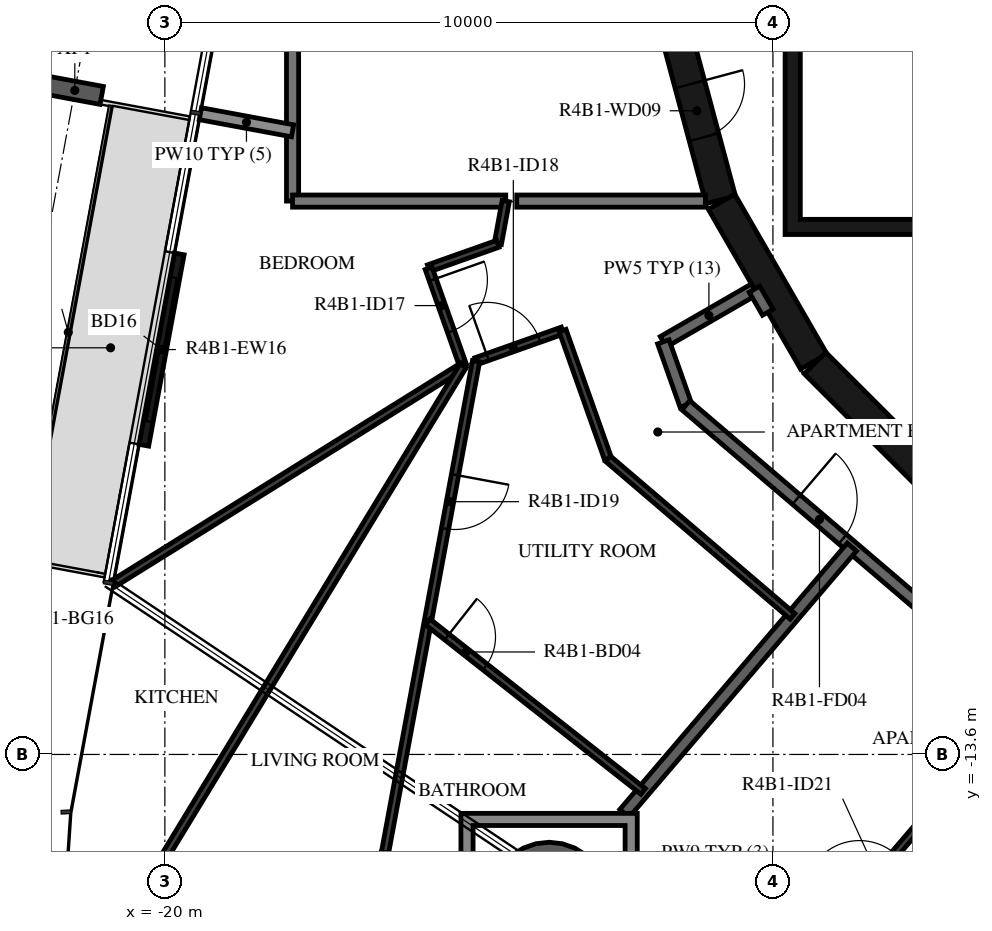
"""IFC4 building model, lengths in metres.
Left out: names, types, materials, properties, quantities, classifications, styles, units other than length and angle.
Written with IfcOpenShell. Run it as: python <this file> out.ifc"""

import sys

from ifc_helpers import new_model, si_unit, direction, frame, frame_2d, origin, origin_2d, place, context, subcontext, project, spatial, polyline, rectangle, hollow_circle, i_section, outline, extrude, element, fill, save


model = new_model("IFC4")
c1 = context("Model", 3, precision=1e-05, world=origin(), true_north=direction((0.0, 1.0)))
c2 = subcontext(c1, "Body", "Model", "MODEL_VIEW")
j1 = project(units=[si_unit("LENGTHUNIT", "METRE"), si_unit("PLANEANGLEUNIT", "RADIAN")], contexts=[c1])
p1 = place(None, origin())
s1 = spatial("IfcSite", under=j1, at=p1, CompositionType="ELEMENT")
p2 = place(p1, origin())
s2 = spatial("IfcBuilding", under=s1, at=p2, CompositionType="ELEMENT")
p3 = place(p2, frame((0.0, 0.0, 162.2)))
s3 = spatial("IfcBuildingStorey", under=s2, at=p3, CompositionType="ELEMENT", Elevation=162.2)
p4 = place(p3, frame((-13.681, -16.019, -0.38), z_axis=(0.0, 0.0, 1.0), x_axis=(1.0, 0.0, 0.0)))
e1 = element("IfcColumn", 1, at=p4, inside=s3, PredefinedType="COLUMN", context=c2, shape_type="SweptSolid", body=[
    extrude(hollow_circle(Radius=0.975, WallThickness=0.045, at=origin_2d()), origin(), (0.0, 0.0, 1.0), 3.5),
])
p5 = place(p3, frame((-21.481, -2.68, -0.38), z_axis=(0.0, 0.0, 1.0), x_axis=(0.182235967681, 0.983254825609, 0.0)))
e2 = element("IfcColumn", 2, at=p5, inside=s3, PredefinedType="COLUMN", context=c2, shape_type="SweptSolid", body=[
    extrude(i_section(OverallWidth=0.3, OverallDepth=0.9, WebThickness=0.019, FlangeThickness=0.035, FilletRadius=0.03, at=origin_2d()), origin(), (0.0, 0.0, 1.0), 3.5),
])
p6 = place(p3, frame((-19.762, -5.369, 0.0), z_axis=(0.0, 0.0, 1.0), x_axis=(-0.18226136951, -0.983250117307, 0.0)))
e3 = element("IfcWall", 3, at=p6, inside=s3, PredefinedType="STANDARD", context=c2, shape_type="SweptSolid", body=[
    extrude(rectangle(XDim=3.2, YDim=0.16, at=frame_2d((1.6, 0.0))), origin(), (0.0, 0.0, 1.0), 3.12),
])
p7 = place(p6, frame((0.4, 0.0, 0.0)))
e4 = element("IfcOpeningElement", 4, at=p7, cuts=e3, PredefinedType="OPENING", context=c2, shape_type="SweptSolid", body=[
    extrude(rectangle(XDim=2.4, YDim=2.4, at=frame_2d((1.2, 1.2))), frame((0.0, 0.09, 0.0), z_axis=(0.0, -1.0, 0.0), x_axis=(1.0, 0.0, 0.0)), (0.0, 0.0, 1.0), 0.18),
])
p8 = place(p3, frame((-11.643, -1.55, 0.0), z_axis=(0.0, 0.0, 1.0), x_axis=(0.258734743916, -0.965948410781, 0.0)))
e5 = element("IfcWall", 5, at=p8, inside=s3, PredefinedType="SHEAR", context=c2, shape_type="SweptSolid", body=[
    extrude(rectangle(XDim=3.033, YDim=0.5, at=frame_2d((1.516, 0.0))), origin(), (0.0, 0.0, 1.0), 3.12),
])
p9 = place(p8, frame((1.066, 0.0, 0.0)))
e6 = element("IfcOpeningElement", 6, at=p9, cuts=e5, PredefinedType="OPENING", context=c2, shape_type="SweptSolid", body=[
    extrude(rectangle(XDim=0.9, YDim=2.1, at=frame_2d((0.45, 1.05))), frame((0.0, 0.26, 0.0), z_axis=(0.0, -1.0, 0.0), x_axis=(1.0, 0.0, 0.0)), (0.0, 0.0, 1.0), 0.52),
])
p10 = place(p3, frame((-10.845, -4.51, 0.0), z_axis=(0.0, 0.0, 1.0), x_axis=(0.500087131594, -0.865975092491, 0.0)))
e7 = element("IfcWall", 7, at=p10, inside=s3, PredefinedType="SHEAR", context=c2, shape_type="SweptSolid", body=[
    extrude(rectangle(XDim=3.033, YDim=0.5, at=frame_2d((1.516, 0.0))), origin(), (0.0, 0.0, 1.0), 3.12),
])
p11 = place(p3, frame((-9.308, -7.164, 0.0), z_axis=(0.0, 0.0, 1.0), x_axis=(0.707106781187, -0.707106781187, 0.0)))
e8 = element("IfcWall", 8, at=p11, inside=s3, PredefinedType="SHEAR", context=c2, shape_type="SweptSolid", body=[
    extrude(rectangle(XDim=3.032, YDim=0.5, at=frame_2d((1.516, 0.0))), origin(), (0.0, 0.0, 1.0), 3.12),
])
p12 = place(p3, origin())
e9 = element("IfcWall", 9, at=p12, inside=s3, PredefinedType="SHEAR", context=c2, shape_type="SweptSolid", body=[
    extrude(outline(polyline([(9.8, -5.05), (9.8, -4.8), (9.8, -1.9), (9.55, -1.9), (9.55, -4.8), (7.65, -4.8), (7.65, -1.9), (7.4, -1.9), (7.4, -4.8), (5.5, -4.8), (5.5, -1.9), (5.25, -1.9), (5.25, -4.8), (3.35, -4.8), (3.35, -1.9), (3.1, -1.9), (3.1, -4.8), (1.2, -4.8), (1.2, -1.9), (0.95, -1.9), (0.95, -4.8), (-5.25, -4.8), (-5.25, -1.9), (-5.5, -1.9), (-5.5, -4.8), (-7.4, -4.8), (-7.4, -1.9), (-7.65, -1.9), (-7.65, -4.8), (-9.55, -4.8), (-9.55, -1.9), (-9.8, -1.9), (-9.8, -4.8), (-9.8, -5.05), (9.8, -5.05)])), origin(), (0.0, 0.0, 1.0), 3.12),
])
p13 = place(p3, frame((-10.303, -5.949, 0.0), z_axis=(0.0, 0.0, 1.0), x_axis=(-0.866021168401, -0.500007335828, 0.0)))
e10 = element("IfcWall", 10, at=p13, inside=s3, PredefinedType="STANDARD", context=c2, shape_type="SweptSolid", body=[
    extrude(rectangle(XDim=1.731, YDim=0.2, at=frame_2d((0.865, 0.0))), origin(), (0.0, 0.0, 1.0), 3.12),
])
p14 = place(p3, frame((-11.802, -6.814, 0.0), z_axis=(0.0, 0.0, 1.0), x_axis=(0.333904297771, -0.942606980629, 0.0)))
e11 = element("IfcWall", 11, at=p14, inside=s3, PredefinedType="STANDARD", context=c2, shape_type="SweptSolid", body=[
    extrude(rectangle(XDim=1.107, YDim=0.2, at=frame_2d((0.553, 0.0))), origin(), (0.0, 0.0, 1.0), 3.12),
])
p15 = place(p3, frame((-11.433, -7.858, 0.0), z_axis=(0.0, 0.0, 1.0), x_axis=(0.760412154545, -0.649440801937, 0.0)))
e12 = element("IfcWall", 12, at=p15, inside=s3, PredefinedType="STANDARD", context=c2, shape_type="SweptSolid", body=[
    extrude(rectangle(XDim=7.181, YDim=0.2, at=frame_2d((3.59, 0.0))), origin(), (0.0, 0.0, 1.0), 3.12),
])
p16 = place(p15, frame((2.39, 0.0, 0.0)))
e13 = element("IfcOpeningElement", 13, at=p16, cuts=e12, PredefinedType="OPENING", context=c2, shape_type="SweptSolid", body=[
    extrude(rectangle(XDim=1.0, YDim=2.1, at=frame_2d((0.5, 1.05))), frame((0.0, 0.11, 0.0), z_axis=(0.0, -1.0, 0.0), x_axis=(1.0, 0.0, 0.0)), (0.0, 0.0, 1.0), 0.22),
])
p17 = place(p3, frame((-10.303, -5.949, 0.0), z_axis=(0.0, 0.0, 1.0), x_axis=(0.499980071345, -0.866036909293, 0.0)))
e14 = element("IfcWall", 14, at=p17, inside=s3, PredefinedType="STANDARD", context=c2, shape_type="SweptSolid", body=[
    extrude(rectangle(XDim=0.438, YDim=0.2, at=frame_2d((0.219, 0.0))), origin(), (0.0, 0.0, 1.0), 3.12),
])
p18 = place(p3, frame((-17.9, 4.5, 0.0), z_axis=(0.0, 0.0, 1.0), x_axis=(0.0, -1.0, 0.0)))
e15 = element("IfcWall", 15, at=p18, inside=s3, PredefinedType="STANDARD", context=c2, shape_type="SweptSolid", body=[
    extrude(rectangle(XDim=9.0, YDim=0.2, at=frame_2d((4.5, 0.0))), origin(), (0.0, 0.0, 1.0), 3.12),
])
p19 = place(p3, frame((-14.213, -4.5, 0.0), z_axis=(0.0, 0.0, 1.0), x_axis=(1.0, 0.0, 0.0)))
e16 = element("IfcWall", 16, at=p19, inside=s3, PredefinedType="STANDARD", context=c2, shape_type="SweptSolid", body=[
    extrude(rectangle(XDim=3.102, YDim=0.2, at=frame_2d((1.551, 0.0))), origin(), (0.0, 0.0, 1.0), 3.12),
])
p20 = place(p3, frame((-17.9, -4.5, 0.0), z_axis=(0.0, 0.0, 1.0), x_axis=(1.0, 0.0, 0.0)))
e17 = element("IfcWall", 17, at=p20, inside=s3, PredefinedType="STANDARD", context=c2, shape_type="SweptSolid", body=[
    extrude(rectangle(XDim=3.506, YDim=0.2, at=frame_2d((1.753, 0.0))), origin(), (0.0, 0.0, 1.0), 3.12),
])
p21 = place(p3, frame((-19.416, -3.063, 0.0), z_axis=(0.0, 0.0, 1.0), x_axis=(0.983258901558, -0.182213974512, 0.0)))
e18 = element("IfcWall", 18, at=p21, inside=s3, PredefinedType="STANDARD", context=c2, shape_type="SweptSolid", body=[
    extrude(rectangle(XDim=1.542, YDim=0.2, at=frame_2d((0.771, 0.0))), origin(), (0.0, 0.0, 1.0), 2.73),
])
p22 = place(p3, frame((-12.441, -14.569, 0.0), z_axis=(0.0, 0.0, 1.0), x_axis=(0.649446013128, 0.760407703822, 0.0)))
e19 = element("IfcWall", 19, at=p22, inside=s3, PredefinedType="STANDARD", context=c2, shape_type="SweptSolid", body=[
    extrude(rectangle(XDim=5.758, YDim=0.2, at=frame_2d((2.879, 0.0))), origin(), (0.0, 0.0, 1.0), 3.12),
])
p23 = place(p3, frame((-14.394, -4.5, 0.0), z_axis=(0.0, 0.0, 1.0), x_axis=(-0.182101494457, -0.983279739299, 0.0)))
e20 = element("IfcWall", 20, at=p23, inside=s3, PredefinedType="PARTITIONING", context=c2, shape_type="SweptSolid", body=[
    extrude(rectangle(XDim=0.715, YDim=0.12, at=frame_2d((0.357, 0.0))), origin(), (0.0, 0.0, 1.0), 3.12),
])
p24 = place(p3, frame((-14.524, -5.203, 0.0), z_axis=(0.0, 0.0, 1.0), x_axis=(-0.942657704592, -0.333761070187, 0.0)))
e21 = element("IfcWall", 21, at=p24, inside=s3, PredefinedType="PARTITIONING", context=c2, shape_type="SweptSolid", body=[
    extrude(rectangle(XDim=1.208, YDim=0.12, at=frame_2d((0.604, 0.0))), origin(), (0.0, 0.0, 1.0), 3.12),
])
p25 = place(p3, frame((-15.663, -5.606, 0.0), z_axis=(0.0, 0.0, 1.0), x_axis=(0.333751436931, -0.942661115325, 0.0)))
e22 = element("IfcWall", 22, at=p25, inside=s3, PredefinedType="PARTITIONING", context=c2, shape_type="SweptSolid", body=[
    extrude(rectangle(XDim=1.7, YDim=0.12, at=frame_2d((0.85, 0.0))), origin(), (0.0, 0.0, 1.0), 3.12),
])
p26 = place(p25, frame((0.2, 0.0, 0.0)))
e23 = element("IfcOpeningElement", 23, at=p26, cuts=e22, PredefinedType="OPENING", context=c2, shape_type="SweptSolid", body=[
    extrude(rectangle(XDim=0.9, YDim=2.1, at=frame_2d((0.45, 1.05))), frame((0.0, 0.07, 0.0), z_axis=(0.0, -1.0, 0.0), x_axis=(1.0, 0.0, 0.0)), (0.0, 0.0, 1.0), 0.14),
])
p27 = place(p3, frame((-14.882, -7.133, 0.0), z_axis=(0.0, 0.0, 1.0), x_axis=(0.942631466676, 0.333835165961, 0.0)))
e24 = element("IfcWall", 24, at=p27, inside=s3, PredefinedType="PARTITIONING", context=c2, shape_type="SweptSolid", body=[
    extrude(rectangle(XDim=1.51, YDim=0.12, at=frame_2d((0.755, 0.0))), origin(), (0.0, 0.0, 1.0), 3.12),
])
p28 = place(p27, frame((0.2, 0.0, 0.0)))
e25 = element("IfcOpeningElement", 25, at=p28, cuts=e24, PredefinedType="OPENING", context=c2, shape_type="SweptSolid", body=[
    extrude(rectangle(XDim=0.9, YDim=2.1, at=frame_2d((0.45, 1.05))), frame((0.0, 0.07, 0.0), z_axis=(0.0, -1.0, 0.0), x_axis=(1.0, 0.0, 0.0)), (0.0, 0.0, 1.0), 0.14),
])
p29 = place(p3, frame((-13.459, -6.629, 0.0), z_axis=(0.0, 0.0, 1.0), x_axis=(0.333790565501, -0.942647260847, 0.0)))
e26 = element("IfcWall", 26, at=p29, inside=s3, PredefinedType="PARTITIONING", context=c2, shape_type="SweptSolid", body=[
    extrude(rectangle(XDim=2.237, YDim=0.12, at=frame_2d((1.118, 0.0))), origin(), (0.0, 0.0, 1.0), 3.12),
])
p30 = place(p3, frame((-12.713, -8.737, 0.0), z_axis=(0.0, 0.0, 1.0), x_axis=(0.760420863476, -0.649430604754, 0.0)))
e27 = element("IfcWall", 27, at=p30, inside=s3, PredefinedType="PARTITIONING", context=c2, shape_type="SweptSolid", body=[
    extrude(rectangle(XDim=3.992, YDim=0.12, at=frame_2d((1.996, 0.0))), origin(), (0.0, 0.0, 1.0), 3.12),
])
p31 = place(p3, frame((-20.849, -10.792, 0.0), z_axis=(0.0, 0.0, 1.0), x_axis=(0.848835001009, 0.528657867682, 0.0)))
e28 = element("IfcWall", 28, at=p31, inside=s3, PredefinedType="PARTITIONING", context=c2, shape_type="SweptSolid", body=[
    extrude(rectangle(XDim=6.778, YDim=0.12, at=frame_2d((3.389, 0.0))), origin(), (0.0, 0.0, 1.0), 3.12),
])
p32 = place(p3, frame((-21.461, -17.671, 0.0), z_axis=(0.0, 0.0, 1.0), x_axis=(0.519791999186, 0.854292852353, 0.0)))
e29 = element("IfcWall", 29, at=p32, inside=s3, PredefinedType="PARTITIONING", context=c2, shape_type="SweptSolid", body=[
    extrude(rectangle(XDim=12.247, YDim=0.12, at=frame_2d((6.124, 0.0))), origin(), (0.0, 0.0, 1.0), 3.12),
])
p33 = place(p32, frame((1.0, 0.0, 0.0)))
e30 = element("IfcOpeningElement", 30, at=p33, cuts=e29, PredefinedType="OPENING", context=c2, shape_type="SweptSolid", body=[
    extrude(rectangle(XDim=0.9, YDim=2.1, at=frame_2d((0.45, 1.05))), frame((0.0, 0.07, 0.0), z_axis=(0.0, -1.0, 0.0), x_axis=(1.0, 0.0, 0.0)), (0.0, 0.0, 1.0), 0.14),
])
p34 = place(p3, frame((-14.882, -7.133, 0.0), z_axis=(0.0, 0.0, 1.0), x_axis=(-0.182231858218, -0.983255587246, 0.0)))
e31 = element("IfcWall", 31, at=p34, inside=s3, PredefinedType="PARTITIONING", context=c2, shape_type="SweptSolid", body=[
    extrude(rectangle(XDim=8.215, YDim=0.12, at=frame_2d((4.107, 0.0))), origin(), (0.0, 0.0, 1.0), 3.12),
])
p35 = place(p34, frame((1.9, 0.0, 0.0)))
e32 = element("IfcOpeningElement", 32, at=p35, cuts=e31, PredefinedType="OPENING", context=c2, shape_type="SweptSolid", body=[
    extrude(rectangle(XDim=0.9, YDim=2.1, at=frame_2d((0.45, 1.05))), frame((0.0, 0.07, 0.0), z_axis=(0.0, -1.0, 0.0), x_axis=(1.0, 0.0, 0.0)), (0.0, 0.0, 1.0), 0.14),
])
p36 = place(p3, frame((-15.677, -11.42, 0.0), z_axis=(0.0, 0.0, 1.0), x_axis=(0.785821888461, -0.618452875824, 0.0)))
e33 = element("IfcWall", 33, at=p36, inside=s3, PredefinedType="PARTITIONING", context=c2, shape_type="SweptSolid", body=[
    extrude(rectangle(XDim=4.507, YDim=0.12, at=frame_2d((2.254, 0.0))), origin(), (0.0, 0.0, 1.0), 3.12),
])
p37 = place(p36, frame((0.4, 0.0, 0.0)))
e34 = element("IfcOpeningElement", 34, at=p37, cuts=e33, PredefinedType="OPENING", context=c2, shape_type="SweptSolid", body=[
    extrude(rectangle(XDim=0.8, YDim=2.1, at=frame_2d((0.4, 1.05))), frame((0.0, 0.07, 0.0), z_axis=(0.0, -1.0, 0.0), x_axis=(1.0, 0.0, 0.0)), (0.0, 0.0, 1.0), 0.14),
])
p38 = place(p3, frame((-16.442, -16.155, 0.0), z_axis=(0.0, 0.0, 1.0), x_axis=(0.066775688713, 0.997768012815, 0.0)))
e35 = element("IfcWall", 35, at=p38, inside=s3, PredefinedType="PARTITIONING", context=c2, shape_type="SweptSolid", body=[
    extrude(rectangle(XDim=0.947, YDim=0.12, at=frame_2d((0.474, 0.0))), origin(), (0.0, 0.0, 1.0), 3.12),
])
p39 = place(p3, frame((-10.063, -17.656, 0.0), z_axis=(0.0, 0.0, 1.0), x_axis=(0.649451567172, 0.760402960211, 0.0)))
e36 = element("IfcWall", 36, at=p39, inside=s3, PredefinedType="PARTITIONING", context=c2, shape_type="SweptSolid", body=[
    extrude(rectangle(XDim=5.061, YDim=0.12, at=frame_2d((2.531, 0.0))), origin(), (0.0, 0.0, 1.0), 3.12),
])
p40 = place(p39, frame((2.288, 0.0, 0.0)))
e37 = element("IfcOpeningElement", 37, at=p40, cuts=e36, PredefinedType="OPENING", context=c2, shape_type="SweptSolid", body=[
    extrude(rectangle(XDim=0.9, YDim=2.1, at=frame_2d((0.45, 1.05))), frame((0.0, 0.07, 0.0), z_axis=(0.0, -1.0, 0.0), x_axis=(1.0, 0.0, 0.0)), (0.0, 0.0, 1.0), 0.14),
])
p41 = place(p3, frame((-1.871, -14.807, 0.0), z_axis=(0.0, 0.0, 1.0), x_axis=(-0.942640759962, -0.333808923874, 0.0)))
e38 = element("IfcWall", 38, at=p41, inside=s3, PredefinedType="PARTITIONING", context=c2, shape_type="SweptSolid", body=[
    extrude(rectangle(XDim=11.234, YDim=0.12, at=frame_2d((5.617, 0.0))), origin(), (0.0, 0.0, 1.0), 3.12),
])
p42 = place(p3, origin())
e39 = element("IfcWall", 39, at=p42, inside=s3, PredefinedType="STANDARD", context=c2, shape_type="SweptSolid", body=[
    extrude(outline(polyline([(-12.231, -14.569), (-12.231, -17.469), (-15.131, -17.469), (-15.131, -14.569), (-12.231, -14.569)]), holes=[polyline([(-14.931, -17.269), (-12.431, -17.269), (-12.431, -14.769), (-14.931, -14.769), (-14.931, -17.269)])]), origin(), (0.0, 0.0, 1.0), 3.12),
])
p43 = place(p7, origin())
e40 = element("IfcDoor", 40, at=p43, inside=s3, OperationType="DOUBLE_DOOR_SLIDING", PredefinedType="DOOR", context=c2, shape_type="SweptSolid", body=[
    extrude(rectangle(XDim=2.4, YDim=2.4, at=frame_2d((1.2, 1.2))), frame((0.0, 0.025, 0.0), z_axis=(0.0, -1.0, 0.0), x_axis=(1.0, 0.0, 0.0)), (0.0, 0.0, 1.0), 0.05),
])
fill(e4, e40)
p44 = place(p9, origin())
e41 = element("IfcDoor", 41, at=p44, inside=s3, OperationType="SINGLE_SWING_LEFT", PredefinedType="DOOR", context=c2, shape_type="SweptSolid", body=[
    extrude(rectangle(XDim=0.9, YDim=2.1, at=frame_2d((0.45, 1.05))), frame((0.0, 0.025, 0.0), z_axis=(0.0, -1.0, 0.0), x_axis=(1.0, 0.0, 0.0)), (0.0, 0.0, 1.0), 0.05),
])
fill(e6, e41)
p45 = place(p16, origin())
e42 = element("IfcDoor", 42, at=p45, inside=s3, OperationType="SINGLE_SWING_RIGHT", PredefinedType="DOOR", context=c2, shape_type="SweptSolid", body=[
    extrude(rectangle(XDim=1.0, YDim=2.1, at=frame_2d((0.5, 1.05))), frame((0.0, 0.025, 0.0), z_axis=(0.0, -1.0, 0.0), x_axis=(1.0, 0.0, 0.0)), (0.0, 0.0, 1.0), 0.05),
])
fill(e13, e42)
p46 = place(p26, origin())
e43 = element("IfcDoor", 43, at=p46, inside=s3, OperationType="SINGLE_SWING_RIGHT", PredefinedType="DOOR", context=c2, shape_type="SweptSolid", body=[
    extrude(rectangle(XDim=0.9, YDim=2.1, at=frame_2d((0.45, 1.05))), frame((0.0, 0.025, 0.0), z_axis=(0.0, -1.0, 0.0), x_axis=(1.0, 0.0, 0.0)), (0.0, 0.0, 1.0), 0.05),
])
fill(e23, e43)
p47 = place(p28, origin())
e44 = element("IfcDoor", 44, at=p47, inside=s3, OperationType="SINGLE_SWING_LEFT", PredefinedType="DOOR", context=c2, shape_type="SweptSolid", body=[
    extrude(rectangle(XDim=0.9, YDim=2.1, at=frame_2d((0.45, 1.05))), frame((0.0, 0.025, 0.0), z_axis=(0.0, -1.0, 0.0), x_axis=(1.0, 0.0, 0.0)), (0.0, 0.0, 1.0), 0.05),
])
fill(e25, e44)
p48 = place(p35, origin())
e45 = element("IfcDoor", 45, at=p48, inside=s3, OperationType="SINGLE_SWING_RIGHT", PredefinedType="DOOR", context=c2, shape_type="SweptSolid", body=[
    extrude(rectangle(XDim=0.9, YDim=2.1, at=frame_2d((0.45, 1.05))), frame((0.0, 0.025, 0.0), z_axis=(0.0, -1.0, 0.0), x_axis=(1.0, 0.0, 0.0)), (0.0, 0.0, 1.0), 0.05),
])
fill(e32, e45)
p49 = place(p37, origin())
e46 = element("IfcDoor", 46, at=p49, inside=s3, OperationType="SINGLE_SWING_RIGHT", PredefinedType="DOOR", context=c2, shape_type="SweptSolid", body=[
    extrude(rectangle(XDim=0.8, YDim=2.1, at=frame_2d((0.4, 1.05))), frame((0.0, 0.025, 0.0), z_axis=(0.0, -1.0, 0.0), x_axis=(1.0, 0.0, 0.0)), (0.0, 0.0, 1.0), 0.05),
])
fill(e34, e46)
save(model, sys.argv[1])
